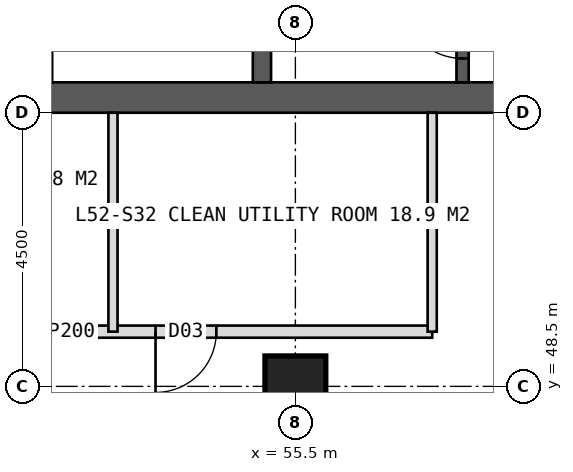
"""IFC4 building model, lengths in metres.
Left out: names, types, materials, properties, quantities, classifications, styles, units other than length and angle.
Written with IfcOpenShell. Run it as: python <this file> out.ifc"""

import sys

from ifc_helpers import new_model, si_unit, direction, frame, frame_2d, origin, origin_2d, place, context, subcontext, project, spatial, rectangle, hollow_rectangle, extrude, element, fill, save


model = new_model("IFC4")
c1 = context("Model", 3, precision=1e-05, world=origin(), true_north=direction((0.0, 1.0)))
c2 = subcontext(c1, "Body", "Model", "MODEL_VIEW")
j1 = project(units=[si_unit("LENGTHUNIT", "METRE"), si_unit("PLANEANGLEUNIT", "RADIAN")], contexts=[c1])
p1 = place(None, origin())
s1 = spatial("IfcSite", under=j1, at=p1, CompositionType="ELEMENT")
p2 = place(p1, origin())
s2 = spatial("IfcBuilding", under=s1, at=p2, CompositionType="ELEMENT")
p3 = place(p2, frame((0.0, 0.0, 217.0)))
s3 = spatial("IfcBuildingStorey", under=s2, at=p3, CompositionType="ELEMENT", Elevation=217.0)
p4 = place(p3, frame((51.0, 53.25, 0.0), z_axis=(0.0, 0.0, 1.0), x_axis=(1.0, 0.0, 0.0)))
e1 = element("IfcWall", 1, at=p4, inside=s3, PredefinedType="SHEAR", context=c2, shape_type="SweptSolid", body=[
    extrude(rectangle(XDim=18.0, YDim=0.5, at=frame_2d((9.0, 0.0))), origin(), (0.0, 0.0, 1.0), 4.0),
])
p5 = place(p4, frame((8.1, 0.0, 0.0)))
e2 = element("IfcOpeningElement", 2, at=p5, cuts=e1, PredefinedType="OPENING", context=c2, shape_type="SweptSolid", body=[
    extrude(rectangle(XDim=1.8, YDim=2.2, at=frame_2d((0.9, 1.1))), frame((0.0, 0.26, 0.0), z_axis=(0.0, -1.0, 0.0), x_axis=(1.0, 0.0, 0.0)), (0.0, 0.0, 1.0), 0.52),
])
p6 = place(p3, frame((54.95, 53.5, 0.0), z_axis=(0.0, 0.0, 1.0), x_axis=(0.0, 1.0, 0.0)))
e3 = element("IfcWall", 3, at=p6, inside=s3, PredefinedType="SHEAR", context=c2, shape_type="SweptSolid", body=[
    extrude(rectangle(XDim=17.0, YDim=0.3, at=frame_2d((8.5, 0.0))), origin(), (0.0, 0.0, 1.0), 4.0),
])
p7 = place(p3, frame((58.25, 53.5, 0.0), z_axis=(0.0, 0.0, 1.0), x_axis=(0.0, 1.0, 0.0)))
e4 = element("IfcWall", 4, at=p7, inside=s3, PredefinedType="SHEAR", context=c2, shape_type="SweptSolid", body=[
    extrude(rectangle(XDim=17.0, YDim=0.2, at=frame_2d((8.5, 0.0))), origin(), (0.0, 0.0, 1.0), 4.0),
])
p8 = place(p7, frame((0.393, 0.0, 0.0)))
e5 = element("IfcOpeningElement", 5, at=p8, cuts=e4, PredefinedType="OPENING", context=c2, shape_type="SweptSolid", body=[
    extrude(rectangle(XDim=1.0, YDim=2.1, at=frame_2d((0.5, 1.05))), frame((0.0, 0.11, 0.0), z_axis=(0.0, -1.0, 0.0), x_axis=(1.0, 0.0, 0.0)), (0.0, 0.0, 1.0), 0.22),
])
p9 = place(p7, frame((2.542, 0.0, 0.0)))
e6 = element("IfcOpeningElement", 6, at=p9, cuts=e4, PredefinedType="OPENING", context=c2, shape_type="SweptSolid", body=[
    extrude(rectangle(XDim=1.0, YDim=2.1, at=frame_2d((0.5, 1.05))), frame((0.0, 0.11, 0.0), z_axis=(0.0, -1.0, 0.0), x_axis=(1.0, 0.0, 0.0)), (0.0, 0.0, 1.0), 0.22),
])
p10 = place(p7, frame((5.127, 0.0, 0.0)))
e7 = element("IfcOpeningElement", 7, at=p10, cuts=e4, PredefinedType="OPENING", context=c2, shape_type="SweptSolid", body=[
    extrude(rectangle(XDim=1.0, YDim=2.1, at=frame_2d((0.5, 1.05))), frame((0.0, 0.11, 0.0), z_axis=(0.0, -1.0, 0.0), x_axis=(1.0, 0.0, 0.0)), (0.0, 0.0, 1.0), 0.22),
])
p11 = place(p7, frame((7.228, 0.0, 0.0)))
e8 = element("IfcOpeningElement", 8, at=p11, cuts=e4, PredefinedType="OPENING", context=c2, shape_type="SweptSolid", body=[
    extrude(rectangle(XDim=1.0, YDim=2.1, at=frame_2d((0.5, 1.05))), frame((0.0, 0.11, 0.0), z_axis=(0.0, -1.0, 0.0), x_axis=(1.0, 0.0, 0.0)), (0.0, 0.0, 1.0), 0.22),
])
p12 = place(p7, frame((10.025, 0.0, 0.0)))
e9 = element("IfcOpeningElement", 9, at=p12, cuts=e4, PredefinedType="OPENING", context=c2, shape_type="SweptSolid", body=[
    extrude(rectangle(XDim=1.4, YDim=2.2, at=frame_2d((0.7, 1.1))), frame((0.0, 0.11, 0.0), z_axis=(0.0, -1.0, 0.0), x_axis=(1.0, 0.0, 0.0)), (0.0, 0.0, 1.0), 0.22),
])
p13 = place(p7, frame((14.325, 0.0, 0.0)))
e10 = element("IfcOpeningElement", 10, at=p13, cuts=e4, PredefinedType="OPENING", context=c2, shape_type="SweptSolid", body=[
    extrude(rectangle(XDim=1.4, YDim=2.2, at=frame_2d((0.7, 1.1))), frame((0.0, 0.11, 0.0), z_axis=(0.0, -1.0, 0.0), x_axis=(1.0, 0.0, 0.0)), (0.0, 0.0, 1.0), 0.22),
])
p14 = place(p3, frame((55.5, 48.5, 0.0), z_axis=(0.0, 0.0, 1.0), x_axis=(1.0, 0.0, 0.0)))
e11 = element("IfcColumn", 11, at=p14, inside=s3, PredefinedType="COLUMN", context=c2, shape_type="SweptSolid", body=[
    extrude(hollow_rectangle(XDim=1.0, YDim=1.0, WallThickness=0.1, at=origin_2d()), origin(), (0.0, 0.0, 1.0), 4.0),
])
p15 = place(p3, frame((57.75, 49.4, 0.0), z_axis=(0.0, 0.0, 1.0), x_axis=(-1.0, 0.0, 0.0)))
e12 = element("IfcWall", 12, at=p15, inside=s3, PredefinedType="PARTITIONING", context=c2, shape_type="SweptSolid", body=[
    extrude(rectangle(XDim=11.85, YDim=0.2, at=frame_2d((5.925, 0.0))), origin(), (0.0, 0.0, 1.0), 3.75),
])
p16 = place(p15, frame((3.55, 0.0, 0.0)))
e13 = element("IfcOpeningElement", 13, at=p16, cuts=e12, PredefinedType="OPENING", context=c2, shape_type="SweptSolid", body=[
    extrude(rectangle(XDim=1.0, YDim=2.1, at=frame_2d((0.5, 1.05))), frame((0.0, 0.11, 0.0), z_axis=(0.0, -1.0, 0.0), x_axis=(1.0, 0.0, 0.0)), (0.0, 0.0, 1.0), 0.22),
])
p17 = place(p15, frame((8.05, 0.0, 0.0)))
e14 = element("IfcOpeningElement", 14, at=p17, cuts=e12, PredefinedType="OPENING", context=c2, shape_type="SweptSolid", body=[
    extrude(rectangle(XDim=1.0, YDim=2.1, at=frame_2d((0.5, 1.05))), frame((0.0, 0.11, 0.0), z_axis=(0.0, -1.0, 0.0), x_axis=(1.0, 0.0, 0.0)), (0.0, 0.0, 1.0), 0.22),
])
for number, where, z_axis, x_axis in (
    (15, (57.75, 53.0, 0.0), (0.0, 0.0, 1.0), (0.0, -1.0, 0.0)),
    (16, (52.5, 53.0, 0.0), (0.0, 0.0, 1.0), (0.0, -1.0, 0.0)),
):
    element("IfcWall", number, at=place(p3, frame(where, z_axis=z_axis, x_axis=x_axis)), inside=s3, PredefinedType="PARTITIONING", context=c2, shape_type="SweptSolid", body=[
        extrude(rectangle(XDim=3.6, YDim=0.15, at=frame_2d((1.8, 0.0))), origin(), (0.0, 0.0, 1.0), 3.75),
    ])
p18 = place(p16, origin())
e17 = element("IfcDoor", 17, at=p18, inside=s3, OperationType="SINGLE_SWING_RIGHT", PredefinedType="DOOR", context=c2, shape_type="SweptSolid", body=[
    extrude(rectangle(XDim=1.0, YDim=2.1, at=frame_2d((0.5, 1.05))), frame((0.0, 0.025, 0.0), z_axis=(0.0, -1.0, 0.0), x_axis=(1.0, 0.0, 0.0)), (0.0, 0.0, 1.0), 0.05),
])
fill(e13, e17)
p19 = place(p8, origin())
e18 = element("IfcDoor", 18, at=p19, inside=s3, OperationType="SINGLE_SWING_RIGHT", PredefinedType="DOOR", context=c2, shape_type="SweptSolid", body=[
    extrude(rectangle(XDim=1.0, YDim=2.1, at=frame_2d((0.5, 1.05))), frame((0.0, 0.025, 0.0), z_axis=(0.0, -1.0, 0.0), x_axis=(1.0, 0.0, 0.0)), (0.0, 0.0, 1.0), 0.05),
])
fill(e5, e18)
save(model, sys.argv[1])
